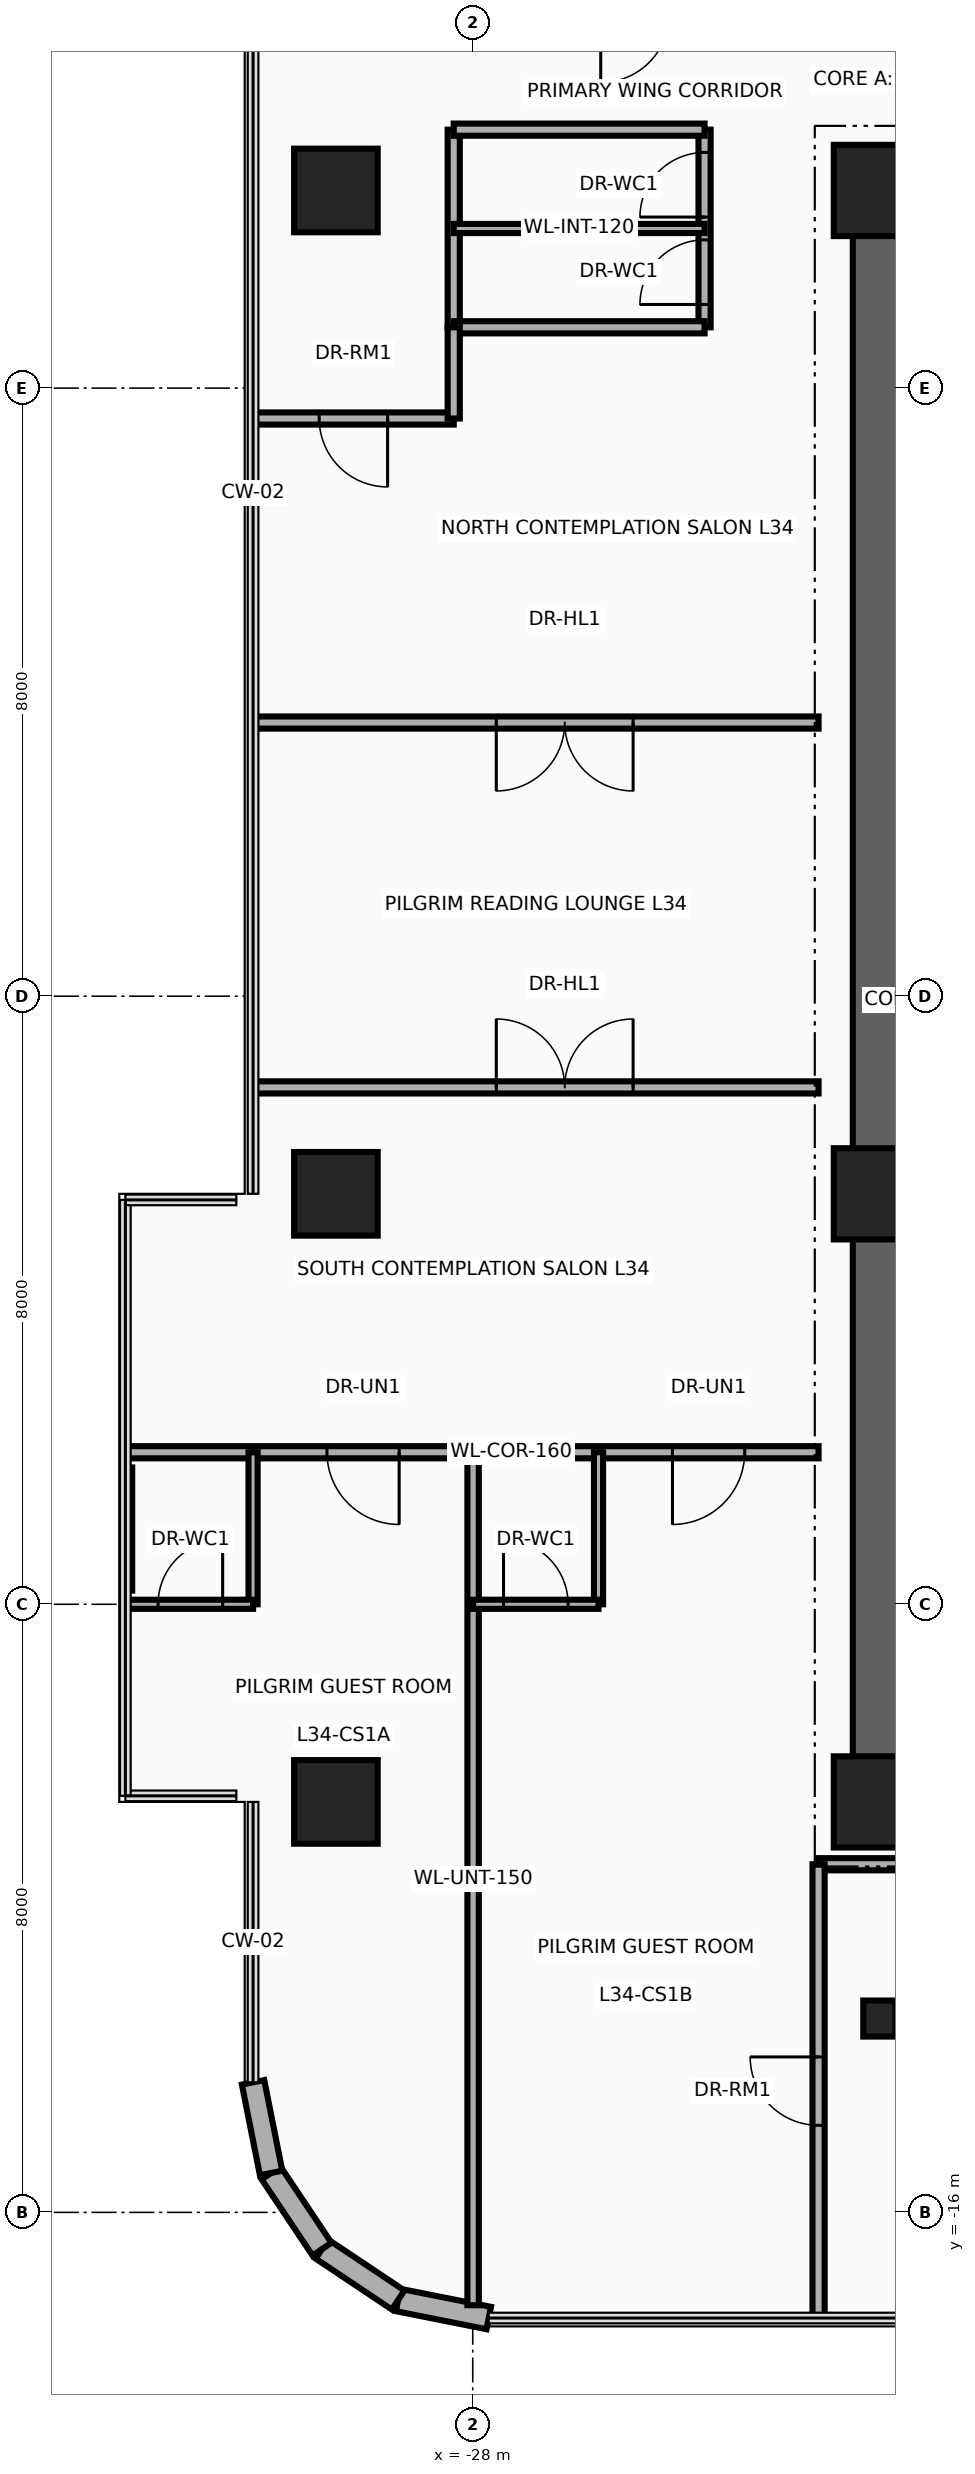
"""IFC4 building model, lengths in metres.
Left out: names, types, materials, properties, quantities, classifications, styles, units other than length and angle.
Written with IfcOpenShell. Run it as: python <this file> out.ifc"""

import sys

from ifc_helpers import new_model, si_unit, direction, frame, frame_2d, origin, origin_2d, place, context, subcontext, project, spatial, rectangle, circle, i_section, extrude, source, transform, mapped, element, fill, save


model = new_model("IFC4")
c1 = context("Model", 3, precision=1e-05, world=origin(), true_north=direction((0.0, 1.0)))
c2 = subcontext(c1, "Body", "Model", "MODEL_VIEW")
j1 = project(units=[si_unit("LENGTHUNIT", "METRE"), si_unit("PLANEANGLEUNIT", "RADIAN")], contexts=[c1])
p1 = place(None, origin())
s1 = spatial("IfcSite", under=j1, at=p1, CompositionType="ELEMENT")
p2 = place(p1, origin())
s2 = spatial("IfcBuilding", under=s1, at=p2, CompositionType="ELEMENT")
p3 = place(p2, frame((0.0, 0.0, 135.3)))
s3 = spatial("IfcBuildingStorey", under=s2, at=p3, CompositionType="ELEMENT", Elevation=135.3)
p4 = place(p3, frame((-22.65, -11.15, 0.0), z_axis=(0.0, 0.0, 1.0), x_axis=(0.0, 1.0, 0.0)))
e1 = element("IfcWall", 1, at=p4, inside=s3, PredefinedType="SHEAR", context=c2, shape_type="SweptSolid", body=[
    extrude(rectangle(XDim=22.3, YDim=0.7, at=frame_2d((11.15, 0.0))), origin(), (0.0, 0.0, 1.0), 3.46),
])
for number, where, z_axis, x_axis in (
    (2, (-22.65, 10.8, 0.0), (0.0, 0.0, 1.0), (1.0, 0.0, 0.0)),
    (3, (-22.65, -10.8, 0.0), (0.0, 0.0, 1.0), (1.0, 0.0, 0.0)),
):
    element("IfcWall", number, at=place(p3, frame(where, z_axis=z_axis, x_axis=x_axis)), inside=s3, PredefinedType="SHEAR", context=c2, shape_type="SweptSolid", body=[
        extrude(rectangle(XDim=10.25, YDim=0.7, at=frame_2d((5.125, 0.0))), origin(), (0.0, 0.0, 1.0), 3.46),
    ])
m1 = source(origin(), c2, "Body", "SweptSolid", [
    extrude(circle(Radius=0.55, at=origin_2d()), origin(), (0.0, 0.0, 1.0), 3.7),
])
p5 = place(p3, frame((-29.8, -10.6, 0.0), z_axis=(0.0, 0.0, 1.0), x_axis=(1.0, 0.0, 0.0)))
e4 = element("IfcColumn", 4, at=p5, inside=s3, PredefinedType="COLUMN", context=c2, shape_type="MappedRepresentation", body=[
    mapped(m1, transform((0.0, 0.0, 0.0), x_axis=(1.0, 0.0, 0.0), y_axis=(0.0, 1.0, 0.0), z_axis=(0.0, 0.0, 1.0), scale=1.0)),
])
m2 = source(origin(), c2, "Body", "SweptSolid", [
    extrude(rectangle(XDim=1.2, YDim=1.2, at=origin_2d()), origin(), (0.0, 0.0, 1.0), 3.7),
])
p6 = place(p3, frame((-22.65, -10.6, 0.0), z_axis=(0.0, 0.0, 1.0), x_axis=(1.0, 0.0, 0.0)))
e5 = element("IfcColumn", 5, at=p6, inside=s3, PredefinedType="COLUMN", context=c2, shape_type="MappedRepresentation", body=[
    mapped(m2, transform((0.0, 0.0, 0.0), x_axis=(1.0, 0.0, 0.0), y_axis=(0.0, 1.0, 0.0), z_axis=(0.0, 0.0, 1.0), scale=1.0)),
])
p7 = place(p3, frame((-29.8, -2.6, 0.0), z_axis=(0.0, 0.0, 1.0), x_axis=(1.0, 0.0, 0.0)))
e6 = element("IfcColumn", 6, at=p7, inside=s3, PredefinedType="COLUMN", context=c2, shape_type="MappedRepresentation", body=[
    mapped(m1, transform((0.0, 0.0, 0.0), x_axis=(1.0, 0.0, 0.0), y_axis=(0.0, 1.0, 0.0), z_axis=(0.0, 0.0, 1.0), scale=1.0)),
])
p8 = place(p3, frame((-22.65, -2.6, 0.0), z_axis=(0.0, 0.0, 1.0), x_axis=(1.0, 0.0, 0.0)))
e7 = element("IfcColumn", 7, at=p8, inside=s3, PredefinedType="COLUMN", context=c2, shape_type="MappedRepresentation", body=[
    mapped(m2, transform((0.0, 0.0, 0.0), x_axis=(1.0, 0.0, 0.0), y_axis=(0.0, 1.0, 0.0), z_axis=(0.0, 0.0, 1.0), scale=1.0)),
])
p9 = place(p3, frame((-29.8, 10.6, 0.0), z_axis=(0.0, 0.0, 1.0), x_axis=(1.0, 0.0, 0.0)))
e8 = element("IfcColumn", 8, at=p9, inside=s3, PredefinedType="COLUMN", context=c2, shape_type="MappedRepresentation", body=[
    mapped(m1, transform((0.0, 0.0, 0.0), x_axis=(1.0, 0.0, 0.0), y_axis=(0.0, 1.0, 0.0), z_axis=(0.0, 0.0, 1.0), scale=1.0)),
])
p10 = place(p3, frame((-22.65, 10.6, 0.0), z_axis=(0.0, 0.0, 1.0), x_axis=(1.0, 0.0, 0.0)))
e9 = element("IfcColumn", 9, at=p10, inside=s3, PredefinedType="COLUMN", context=c2, shape_type="MappedRepresentation", body=[
    mapped(m2, transform((0.0, 0.0, 0.0), x_axis=(1.0, 0.0, 0.0), y_axis=(0.0, 1.0, 0.0), z_axis=(0.0, 0.0, 1.0), scale=1.0)),
])
m3 = source(origin(), c2, "Body", "SweptSolid", [
    extrude(i_section(OverallWidth=0.424, OverallDepth=0.474, WebThickness=0.048, FlangeThickness=0.077, at=origin_2d()), origin(), (0.0, 0.0, 1.0), 3.7),
])
p11 = place(p3, frame((-22.65, -13.45, 0.0), z_axis=(0.0, 0.0, 1.0), x_axis=(1.0, 0.0, 0.0)))
e10 = element("IfcColumn", 10, at=p11, inside=s3, PredefinedType="COLUMN", context=c2, shape_type="MappedRepresentation", body=[
    mapped(m3, transform((0.0, 0.0, 0.0), x_axis=(1.0, 0.0, 0.0), y_axis=(0.0, 1.0, 0.0), z_axis=(0.0, 0.0, 1.0), scale=1.0)),
])
p12 = place(p3, frame((-27.789, -17.39, 0.0), z_axis=(0.0, 0.0, 1.0), x_axis=(-0.980804027463, 0.194996050505, 0.0)))
e11 = element("IfcWall", 11, at=p12, inside=s3, PredefinedType="SOLIDWALL", context=c2, shape_type="SweptSolid", body=[
    extrude(rectangle(XDim=1.216, YDim=0.3, at=frame_2d((0.608, 0.0))), origin(), (0.0, 0.0, 1.0), 3.46),
])
for number, where, z_axis, x_axis in (
    (12, (-28.982, -17.153, 0.0), (0.0, 0.0, 1.0), (-0.831, 0.556, 0.0)),
    (13, (-29.983, -16.483, 0.0), (0.0, 0.0, 1.0), (-0.556, 0.831, 0.0)),
):
    element("IfcWall", number, at=place(p3, frame(where, z_axis=z_axis, x_axis=x_axis)), inside=s3, PredefinedType="SOLIDWALL", context=c2, shape_type="SweptSolid", body=[
        extrude(rectangle(XDim=1.205, YDim=0.3, at=frame_2d((0.603, 0.0))), origin(), (0.0, 0.0, 1.0), 3.46),
    ])
p13 = place(p3, frame((-30.653, -15.482, 0.0), z_axis=(0.0, 0.0, 1.0), x_axis=(-0.194996050505, 0.980804027463, 0.0)))
e14 = element("IfcWall", 14, at=p13, inside=s3, PredefinedType="SOLIDWALL", context=c2, shape_type="SweptSolid", body=[
    extrude(rectangle(XDim=1.216, YDim=0.3, at=frame_2d((0.608, 0.0))), origin(), (0.0, 0.0, 1.0), 3.46),
])
p14 = place(p3, frame((-28.25, 8.8, 0.0), z_axis=(0.0, 0.0, 1.0), x_axis=(0.0, 1.0, 0.0)))
e15 = element("IfcWall", 15, at=p14, inside=s3, PredefinedType="PARTITIONING", context=c2, shape_type="SweptSolid", body=[
    extrude(rectangle(XDim=2.6, YDim=0.16, at=frame_2d((1.3, 0.0))), origin(), (0.0, 0.0, 1.0), 2.666),
])
p15 = place(p3, frame((-24.95, 8.8, 0.0), z_axis=(0.0, 0.0, 1.0), x_axis=(0.0, 1.0, 0.0)))
e16 = element("IfcWall", 16, at=p15, inside=s3, PredefinedType="PARTITIONING", context=c2, shape_type="SweptSolid", body=[
    extrude(rectangle(XDim=2.6, YDim=0.16, at=frame_2d((1.3, 0.0))), origin(), (0.0, 0.0, 1.0), 2.666),
])
p16 = place(p15, frame((0.3, 0.0, 0.0)))
e17 = element("IfcOpeningElement", 17, at=p16, cuts=e16, PredefinedType="OPENING", context=c2, shape_type="SweptSolid", body=[
    extrude(rectangle(XDim=0.85, YDim=2.1, at=frame_2d((0.425, 1.05))), frame((0.0, 0.095, 0.0), z_axis=(0.0, -1.0, 0.0), x_axis=(1.0, 0.0, 0.0)), (0.0, 0.0, 1.0), 0.19),
])
p17 = place(p15, frame((1.45, 0.0, 0.0)))
e18 = element("IfcOpeningElement", 18, at=p17, cuts=e16, PredefinedType="OPENING", context=c2, shape_type="SweptSolid", body=[
    extrude(rectangle(XDim=0.85, YDim=2.1, at=frame_2d((0.425, 1.05))), frame((0.0, 0.095, 0.0), z_axis=(0.0, -1.0, 0.0), x_axis=(1.0, 0.0, 0.0)), (0.0, 0.0, 1.0), 0.19),
])
for number, where, z_axis, x_axis in (
    (19, (-28.25, 8.8, 0.0), (0.0, 0.0, 1.0), (1.0, 0.0, 0.0)),
    (20, (-28.25, 11.4, 0.0), (0.0, 0.0, 1.0), (1.0, 0.0, 0.0)),
):
    element("IfcWall", number, at=place(p3, frame(where, z_axis=z_axis, x_axis=x_axis)), inside=s3, PredefinedType="PARTITIONING", context=c2, shape_type="SweptSolid", body=[
        extrude(rectangle(XDim=3.3, YDim=0.16, at=frame_2d((1.65, 0.0))), origin(), (0.0, 0.0, 1.0), 3.46),
    ])
p18 = place(p3, frame((-28.25, 10.1, 0.0), z_axis=(0.0, 0.0, 1.0), x_axis=(1.0, 0.0, 0.0)))
e21 = element("IfcWall", 21, at=p18, inside=s3, PredefinedType="PARTITIONING", context=c2, shape_type="SweptSolid", body=[
    extrude(rectangle(XDim=3.3, YDim=0.12, at=frame_2d((1.65, 0.0))), origin(), (0.0, 0.0, 1.0), 3.46),
])
p19 = place(p3, frame((-23.45, -11.42, 0.0), z_axis=(0.0, 0.0, 1.0), x_axis=(1.0, 0.0, 0.0)))
e22 = element("IfcWall", 22, at=p19, inside=s3, PredefinedType="PARTITIONING", context=c2, shape_type="SweptSolid", body=[
    extrude(rectangle(XDim=13.84, YDim=0.16, at=frame_2d((6.92, 0.0))), origin(), (0.0, 0.0, 1.0), 2.834),
])
p20 = place(p3, frame((-23.45, -17.39, 0.0), z_axis=(0.0, 0.0, 1.0), x_axis=(0.0, 1.0, 0.0)))
e23 = element("IfcWall", 23, at=p20, inside=s3, PredefinedType="PARTITIONING", context=c2, shape_type="SweptSolid", body=[
    extrude(rectangle(XDim=5.97, YDim=0.16, at=frame_2d((2.985, 0.0))), origin(), (0.0, 0.0, 1.0), 3.46),
])
p21 = place(p20, frame((2.535, 0.0, 0.0)))
e24 = element("IfcOpeningElement", 24, at=p21, cuts=e23, PredefinedType="OPENING", context=c2, shape_type="SweptSolid", body=[
    extrude(rectangle(XDim=0.9, YDim=2.1, at=frame_2d((0.45, 1.05))), frame((0.0, 0.095, 0.0), z_axis=(0.0, -1.0, 0.0), x_axis=(1.0, 0.0, 0.0)), (0.0, 0.0, 1.0), 0.19),
])
p22 = place(p3, frame((-32.54, -6.0, 0.0), z_axis=(0.0, 0.0, 1.0), x_axis=(1.0, 0.0, 0.0)))
e25 = element("IfcWall", 25, at=p22, inside=s3, PredefinedType="PARTITIONING", context=c2, shape_type="SweptSolid", body=[
    extrude(rectangle(XDim=9.09, YDim=0.16, at=frame_2d((4.545, 0.0))), origin(), (0.0, 0.0, 1.0), 2.896),
])
p23 = place(p22, frame((2.622, 0.0, 0.0)))
e26 = element("IfcOpeningElement", 26, at=p23, cuts=e25, PredefinedType="OPENING", context=c2, shape_type="SweptSolid", body=[
    extrude(rectangle(XDim=0.95, YDim=2.15, at=frame_2d((0.475, 1.075))), frame((0.0, 0.095, 0.0), z_axis=(0.0, -1.0, 0.0), x_axis=(1.0, 0.0, 0.0)), (0.0, 0.0, 1.0), 0.19),
])
p24 = place(p22, frame((7.168, 0.0, 0.0)))
e27 = element("IfcOpeningElement", 27, at=p24, cuts=e25, PredefinedType="OPENING", context=c2, shape_type="SweptSolid", body=[
    extrude(rectangle(XDim=0.95, YDim=2.15, at=frame_2d((0.475, 1.075))), frame((0.0, 0.095, 0.0), z_axis=(0.0, -1.0, 0.0), x_axis=(1.0, 0.0, 0.0)), (0.0, 0.0, 1.0), 0.19),
])
p25 = place(p3, frame((-30.89, 7.6, 0.0), z_axis=(0.0, 0.0, 1.0), x_axis=(1.0, 0.0, 0.0)))
e28 = element("IfcWall", 28, at=p25, inside=s3, PredefinedType="PARTITIONING", context=c2, shape_type="SweptSolid", body=[
    extrude(rectangle(XDim=2.64, YDim=0.16, at=frame_2d((1.32, 0.0))), origin(), (0.0, 0.0, 1.0), 2.896),
])
p26 = place(p25, frame((0.87, 0.0, 0.0)))
e29 = element("IfcOpeningElement", 29, at=p26, cuts=e28, PredefinedType="OPENING", context=c2, shape_type="SweptSolid", body=[
    extrude(rectangle(XDim=0.9, YDim=2.1, at=frame_2d((0.45, 1.05))), frame((0.0, 0.095, 0.0), z_axis=(0.0, -1.0, 0.0), x_axis=(1.0, 0.0, 0.0)), (0.0, 0.0, 1.0), 0.19),
])
p27 = place(p3, frame((-28.25, 7.6, 0.0), z_axis=(0.0, 0.0, 1.0), x_axis=(0.0, 1.0, 0.0)))
e30 = element("IfcWall", 30, at=p27, inside=s3, PredefinedType="PARTITIONING", context=c2, shape_type="SweptSolid", body=[
    extrude(rectangle(XDim=1.2, YDim=0.16, at=frame_2d((0.6, 0.0))), origin(), (0.0, 0.0, 1.0), 2.988),
])
p28 = place(p3, frame((-27.995, -17.222, 0.0), z_axis=(0.0, 0.0, 1.0), x_axis=(0.0, 1.0, 0.0)))
e31 = element("IfcWall", 31, at=p28, inside=s3, PredefinedType="PARTITIONING", context=c2, shape_type="SweptSolid", body=[
    extrude(rectangle(XDim=11.222, YDim=0.15, at=frame_2d((5.611, 0.0))), origin(), (0.0, 0.0, 1.0), 2.666),
])
p29 = place(p3, frame((-30.89, -8.0, 0.0), z_axis=(0.0, 0.0, 1.0), x_axis=(0.0, 1.0, 0.0)))
e32 = element("IfcWall", 32, at=p29, inside=s3, PredefinedType="PARTITIONING", context=c2, shape_type="SweptSolid", body=[
    extrude(rectangle(XDim=2.0, YDim=0.12, at=frame_2d((1.0, 0.0))), origin(), (0.0, 0.0, 1.0), 3.46),
])
p30 = place(p3, frame((-32.54, -8.0, 0.0), z_axis=(0.0, 0.0, 1.0), x_axis=(1.0, 0.0, 0.0)))
e33 = element("IfcWall", 33, at=p30, inside=s3, PredefinedType="PARTITIONING", context=c2, shape_type="SweptSolid", body=[
    extrude(rectangle(XDim=1.65, YDim=0.12, at=frame_2d((0.825, 0.0))), origin(), (0.0, 0.0, 1.0), 3.46),
])
p31 = place(p30, frame((0.4, 0.0, 0.0)))
e34 = element("IfcOpeningElement", 34, at=p31, cuts=e33, PredefinedType="OPENING", context=c2, shape_type="SweptSolid", body=[
    extrude(rectangle(XDim=0.85, YDim=2.1, at=frame_2d((0.425, 1.05))), frame((0.0, 0.075, 0.0), z_axis=(0.0, -1.0, 0.0), x_axis=(1.0, 0.0, 0.0)), (0.0, 0.0, 1.0), 0.15),
])
p32 = place(p3, frame((-32.54, -7.82, 0.0), z_axis=(0.0, 0.0, 1.0), x_axis=(0.0, 1.0, 0.0)))
e35 = element("IfcWall", 35, at=p32, inside=s3, PredefinedType="PARTITIONING", context=c2, shape_type="SweptSolid", body=[
    extrude(rectangle(XDim=1.62, YDim=0.12, at=frame_2d((0.81, 0.0))), origin(), (0.0, 0.0, 1.0), 3.46),
])
p33 = place(p3, frame((-26.345, -8.0, 0.0), z_axis=(0.0, 0.0, 1.0), x_axis=(0.0, 1.0, 0.0)))
e36 = element("IfcWall", 36, at=p33, inside=s3, PredefinedType="PARTITIONING", context=c2, shape_type="SweptSolid", body=[
    extrude(rectangle(XDim=2.0, YDim=0.12, at=frame_2d((1.0, 0.0))), origin(), (0.0, 0.0, 1.0), 2.988),
])
p34 = place(p3, frame((-27.995, -8.0, 0.0), z_axis=(0.0, 0.0, 1.0), x_axis=(1.0, 0.0, 0.0)))
e37 = element("IfcWall", 37, at=p34, inside=s3, PredefinedType="PARTITIONING", context=c2, shape_type="SweptSolid", body=[
    extrude(rectangle(XDim=1.65, YDim=0.12, at=frame_2d((0.825, 0.0))), origin(), (0.0, 0.0, 1.0), 3.46),
])
p35 = place(p34, frame((0.4, 0.0, 0.0)))
e38 = element("IfcOpeningElement", 38, at=p35, cuts=e37, PredefinedType="OPENING", context=c2, shape_type="SweptSolid", body=[
    extrude(rectangle(XDim=0.85, YDim=2.1, at=frame_2d((0.425, 1.05))), frame((0.0, 0.075, 0.0), z_axis=(0.0, -1.0, 0.0), x_axis=(1.0, 0.0, 0.0)), (0.0, 0.0, 1.0), 0.15),
])
p36 = place(p3, frame((-30.89, -1.2, 0.0), z_axis=(0.0, 0.0, 1.0), x_axis=(1.0, 0.0, 0.0)))
e39 = element("IfcWall", 39, at=p36, inside=s3, PredefinedType="PARTITIONING", context=c2, shape_type="SweptSolid", body=[
    extrude(rectangle(XDim=7.44, YDim=0.16, at=frame_2d((3.72, 0.0))), origin(), (0.0, 0.0, 1.0), 2.896),
])
p37 = place(p36, frame((3.2, 0.0, 0.0)))
e40 = element("IfcOpeningElement", 40, at=p37, cuts=e39, PredefinedType="OPENING", context=c2, shape_type="SweptSolid", body=[
    extrude(rectangle(XDim=1.8, YDim=2.15, at=frame_2d((0.9, 1.075))), frame((0.0, 0.095, 0.0), z_axis=(0.0, -1.0, 0.0), x_axis=(1.0, 0.0, 0.0)), (0.0, 0.0, 1.0), 0.19),
])
p38 = place(p3, frame((-30.89, 3.6, 0.0), z_axis=(0.0, 0.0, 1.0), x_axis=(1.0, 0.0, 0.0)))
e41 = element("IfcWall", 41, at=p38, inside=s3, PredefinedType="PARTITIONING", context=c2, shape_type="SweptSolid", body=[
    extrude(rectangle(XDim=7.44, YDim=0.16, at=frame_2d((3.72, 0.0))), origin(), (0.0, 0.0, 1.0), 2.896),
])
p39 = place(p38, frame((3.2, 0.0, 0.0)))
e42 = element("IfcOpeningElement", 42, at=p39, cuts=e41, PredefinedType="OPENING", context=c2, shape_type="SweptSolid", body=[
    extrude(rectangle(XDim=1.8, YDim=2.15, at=frame_2d((0.9, 1.075))), frame((0.0, 0.095, 0.0), z_axis=(0.0, -1.0, 0.0), x_axis=(1.0, 0.0, 0.0)), (0.0, 0.0, 1.0), 0.19),
])
p40 = place(p16, origin())
e43 = element("IfcDoor", 43, at=p40, inside=s3, OperationType="SINGLE_SWING_LEFT", PredefinedType="DOOR", context=c2, shape_type="SweptSolid", body=[
    extrude(rectangle(XDim=0.85, YDim=2.1, at=frame_2d((0.425, 1.05))), frame((0.0, 0.025, 0.0), z_axis=(0.0, -1.0, 0.0), x_axis=(1.0, 0.0, 0.0)), (0.0, 0.0, 1.0), 0.05),
])
fill(e17, e43)
p41 = place(p17, origin())
e44 = element("IfcDoor", 44, at=p41, inside=s3, OperationType="SINGLE_SWING_RIGHT", PredefinedType="DOOR", context=c2, shape_type="SweptSolid", body=[
    extrude(rectangle(XDim=0.85, YDim=2.1, at=frame_2d((0.425, 1.05))), frame((0.0, 0.025, 0.0), z_axis=(0.0, -1.0, 0.0), x_axis=(1.0, 0.0, 0.0)), (0.0, 0.0, 1.0), 0.05),
])
fill(e18, e44)
p42 = place(p23, frame((0.95, 0.0, 0.0), z_axis=(0.0, 0.0, 1.0), x_axis=(-1.0, 0.0, 0.0)))
e45 = element("IfcDoor", 45, at=p42, inside=s3, OperationType="SINGLE_SWING_LEFT", PredefinedType="DOOR", context=c2, shape_type="SweptSolid", body=[
    extrude(rectangle(XDim=0.95, YDim=2.15, at=frame_2d((0.475, 1.075))), frame((0.0, 0.025, 0.0), z_axis=(0.0, -1.0, 0.0), x_axis=(1.0, 0.0, 0.0)), (0.0, 0.0, 1.0), 0.05),
])
fill(e26, e45)
p43 = place(p31, origin())
e46 = element("IfcDoor", 46, at=p43, inside=s3, OperationType="SINGLE_SWING_RIGHT", PredefinedType="DOOR", context=c2, shape_type="SweptSolid", body=[
    extrude(rectangle(XDim=0.85, YDim=2.1, at=frame_2d((0.425, 1.05))), frame((0.0, 0.025, 0.0), z_axis=(0.0, -1.0, 0.0), x_axis=(1.0, 0.0, 0.0)), (0.0, 0.0, 1.0), 0.05),
])
fill(e34, e46)
p44 = place(p24, frame((0.95, 0.0, 0.0), z_axis=(0.0, 0.0, 1.0), x_axis=(-1.0, 0.0, 0.0)))
e47 = element("IfcDoor", 47, at=p44, inside=s3, OperationType="SINGLE_SWING_LEFT", PredefinedType="DOOR", context=c2, shape_type="SweptSolid", body=[
    extrude(rectangle(XDim=0.95, YDim=2.15, at=frame_2d((0.475, 1.075))), frame((0.0, 0.025, 0.0), z_axis=(0.0, -1.0, 0.0), x_axis=(1.0, 0.0, 0.0)), (0.0, 0.0, 1.0), 0.05),
])
fill(e27, e47)
p45 = place(p35, origin())
e48 = element("IfcDoor", 48, at=p45, inside=s3, OperationType="SINGLE_SWING_RIGHT", PredefinedType="DOOR", context=c2, shape_type="SweptSolid", body=[
    extrude(rectangle(XDim=0.85, YDim=2.1, at=frame_2d((0.425, 1.05))), frame((0.0, 0.025, 0.0), z_axis=(0.0, -1.0, 0.0), x_axis=(1.0, 0.0, 0.0)), (0.0, 0.0, 1.0), 0.05),
])
fill(e38, e48)
p46 = place(p26, frame((0.9, 0.0, 0.0), z_axis=(0.0, 0.0, 1.0), x_axis=(-1.0, 0.0, 0.0)))
e49 = element("IfcDoor", 49, at=p46, inside=s3, OperationType="SINGLE_SWING_LEFT", PredefinedType="DOOR", context=c2, shape_type="SweptSolid", body=[
    extrude(rectangle(XDim=0.9, YDim=2.1, at=frame_2d((0.45, 1.05))), frame((0.0, 0.025, 0.0), z_axis=(0.0, -1.0, 0.0), x_axis=(1.0, 0.0, 0.0)), (0.0, 0.0, 1.0), 0.05),
])
fill(e29, e49)
p47 = place(p37, origin())
e50 = element("IfcDoor", 50, at=p47, inside=s3, OperationType="DOUBLE_DOOR_SINGLE_SWING", PredefinedType="DOOR", context=c2, shape_type="SweptSolid", body=[
    extrude(rectangle(XDim=1.8, YDim=2.15, at=frame_2d((0.9, 1.075))), frame((0.0, 0.025, 0.0), z_axis=(0.0, -1.0, 0.0), x_axis=(1.0, 0.0, 0.0)), (0.0, 0.0, 1.0), 0.05),
])
fill(e40, e50)
p48 = place(p39, frame((1.8, 0.0, 0.0), z_axis=(0.0, 0.0, 1.0), x_axis=(-1.0, 0.0, 0.0)))
e51 = element("IfcDoor", 51, at=p48, inside=s3, OperationType="DOUBLE_DOOR_SINGLE_SWING", PredefinedType="DOOR", context=c2, shape_type="SweptSolid", body=[
    extrude(rectangle(XDim=1.8, YDim=2.15, at=frame_2d((0.9, 1.075))), frame((0.0, 0.025, 0.0), z_axis=(0.0, -1.0, 0.0), x_axis=(1.0, 0.0, 0.0)), (0.0, 0.0, 1.0), 0.05),
])
fill(e42, e51)
p49 = place(p21, origin())
e52 = element("IfcDoor", 52, at=p49, inside=s3, OperationType="SINGLE_SWING_RIGHT", PredefinedType="DOOR", context=c2, shape_type="SweptSolid", body=[
    extrude(rectangle(XDim=0.9, YDim=2.1, at=frame_2d((0.45, 1.05))), frame((0.0, 0.025, 0.0), z_axis=(0.0, -1.0, 0.0), x_axis=(1.0, 0.0, 0.0)), (0.0, 0.0, 1.0), 0.05),
])
fill(e24, e52)
save(model, sys.argv[1])
